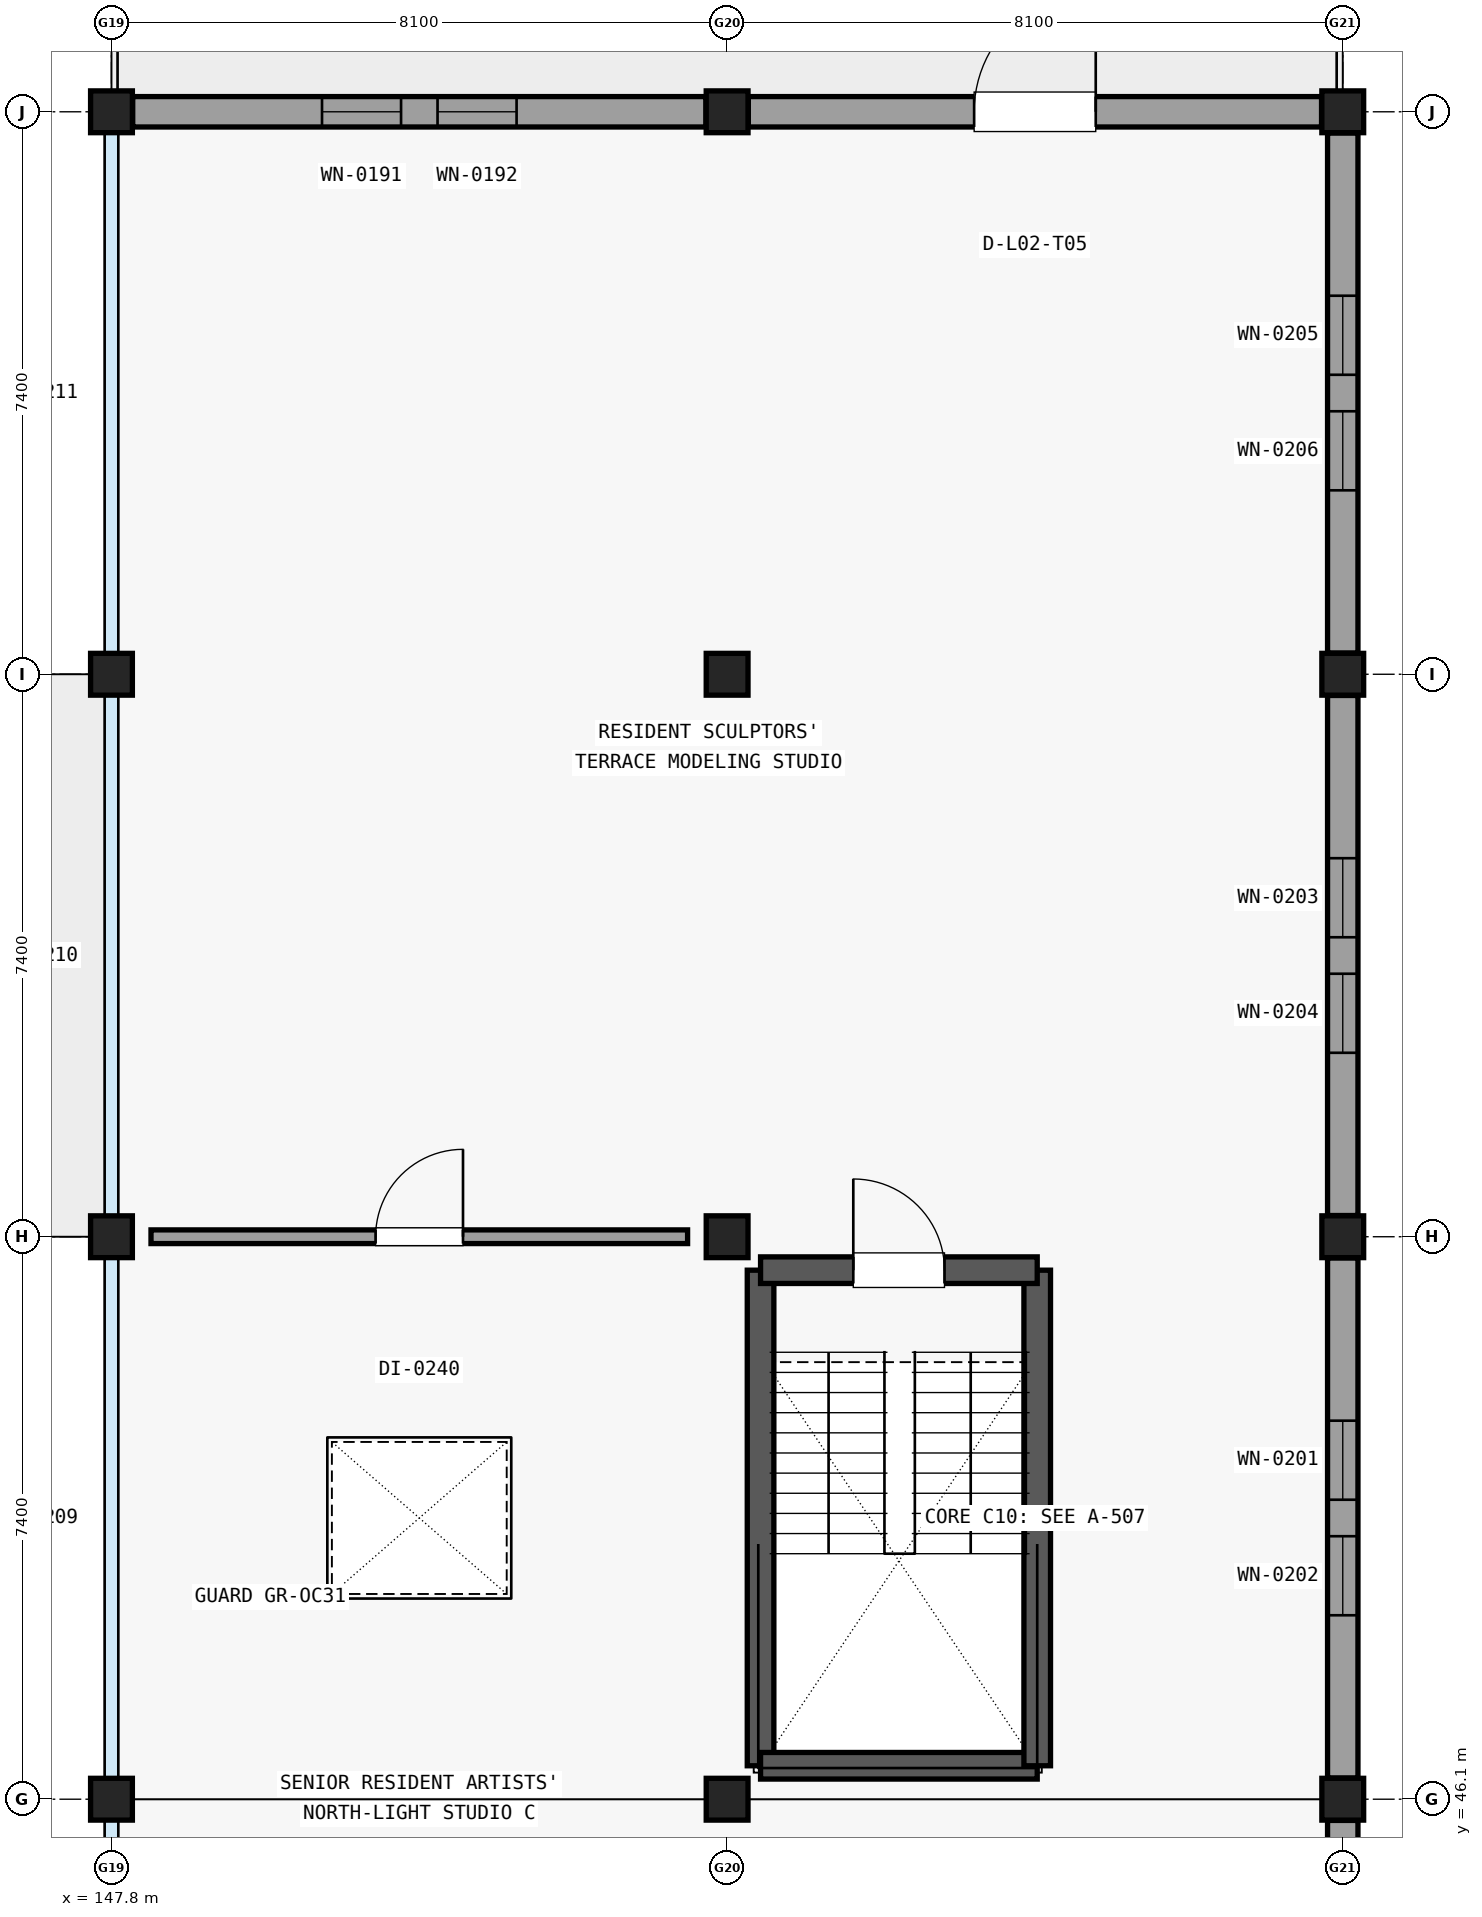
"""IFC4 building model, lengths in metres.
Left out: names, types, materials, properties, quantities, classifications, styles, units other than length and angle.
Written with IfcOpenShell. Run it as: python <this file> out.ifc"""

import sys

from ifc_helpers import new_model, si_unit, direction, frame, frame_2d, origin, origin_2d, place, context, subcontext, project, spatial, rectangle, extrude, element, fill, save


model = new_model("IFC4")
c1 = context("Model", 3, precision=1e-05, world=origin(), true_north=direction((0.0, 1.0)))
c2 = subcontext(c1, "Body", "Model", "MODEL_VIEW")
j1 = project(units=[si_unit("LENGTHUNIT", "METRE"), si_unit("PLANEANGLEUNIT", "RADIAN")], contexts=[c1])
p1 = place(None, origin())
s1 = spatial("IfcSite", under=j1, at=p1, CompositionType="ELEMENT")
p2 = place(p1, origin())
s2 = spatial("IfcBuilding", under=s1, at=p2, CompositionType="ELEMENT")
p3 = place(p2, frame((0.0, 0.0, 10.2)))
s3 = spatial("IfcBuildingStorey", under=s2, at=p3, CompositionType="ELEMENT", Elevation=10.2)
for number, where, z_axis, x_axis in (
    (1, (147.8, 46.1, 0.0), (0.0, 0.0, 1.0), (1.0, 0.0, 0.0)),
    (2, (147.8, 53.5, 0.0), (0.0, 0.0, 1.0), (1.0, 0.0, 0.0)),
    (3, (147.8, 60.9, 0.0), (0.0, 0.0, 1.0), (1.0, 0.0, 0.0)),
    (4, (147.8, 68.3, 0.0), (0.0, 0.0, 1.0), (1.0, 0.0, 0.0)),
    (5, (155.9, 46.1, 0.0), (0.0, 0.0, 1.0), (1.0, 0.0, 0.0)),
    (6, (155.9, 53.5, 0.0), (0.0, 0.0, 1.0), (1.0, 0.0, 0.0)),
    (7, (155.9, 60.9, 0.0), (0.0, 0.0, 1.0), (1.0, 0.0, 0.0)),
    (8, (155.9, 68.3, 0.0), (0.0, 0.0, 1.0), (1.0, 0.0, 0.0)),
    (9, (164.0, 46.1, 0.0), (0.0, 0.0, 1.0), (1.0, 0.0, 0.0)),
    (10, (164.0, 53.5, 0.0), (0.0, 0.0, 1.0), (1.0, 0.0, 0.0)),
    (11, (164.0, 60.9, 0.0), (0.0, 0.0, 1.0), (1.0, 0.0, 0.0)),
    (12, (164.0, 68.3, 0.0), (0.0, 0.0, 1.0), (1.0, 0.0, 0.0)),
):
    element("IfcColumn", number, at=place(p3, frame(where, z_axis=z_axis, x_axis=x_axis)), inside=s3, PredefinedType="COLUMN", context=c2, shape_type="SweptSolid", body=[
        extrude(rectangle(XDim=0.55, YDim=0.55, at=origin_2d()), origin(), (0.0, 0.0, 1.0), 3.37),
    ])
p4 = place(p3, frame((148.079, 68.3, 0.0), z_axis=(0.0, 0.0, 1.0), x_axis=(1.0, 0.0, 0.0)))
e13 = element("IfcWall", 13, at=p4, inside=s3, PredefinedType="SOLIDWALL", context=c2, shape_type="SweptSolid", body=[
    extrude(rectangle(XDim=7.542, YDim=0.4, at=frame_2d((3.771, 0.0))), origin(), (0.0, 0.0, 1.0), 2.898),
])
p5 = place(p4, frame((2.491, 0.0, 0.6)))
e14 = element("IfcOpeningElement", 14, at=p5, cuts=e13, PredefinedType="OPENING", context=c2, shape_type="SweptSolid", body=[
    extrude(rectangle(XDim=1.04, YDim=2.06, at=frame_2d((0.52, 1.03))), frame((0.0, 0.21, 0.0), z_axis=(0.0, -1.0, 0.0), x_axis=(1.0, 0.0, 0.0)), (0.0, 0.0, 1.0), 0.42),
])
p6 = place(p4, frame((4.011, 0.0, 0.6)))
e15 = element("IfcOpeningElement", 15, at=p6, cuts=e13, PredefinedType="OPENING", context=c2, shape_type="SweptSolid", body=[
    extrude(rectangle(XDim=1.04, YDim=2.06, at=frame_2d((0.52, 1.03))), frame((0.0, 0.21, 0.0), z_axis=(0.0, -1.0, 0.0), x_axis=(1.0, 0.0, 0.0)), (0.0, 0.0, 1.0), 0.42),
])
p7 = place(p3, frame((164.0, 45.821, 0.0), z_axis=(0.0, 0.0, 1.0), x_axis=(0.0, -1.0, 0.0)))
e16 = element("IfcWall", 16, at=p7, inside=s3, PredefinedType="SOLIDWALL", context=c2, shape_type="SweptSolid", body=[
    extrude(rectangle(XDim=6.842, YDim=0.4, at=frame_2d((3.421, 0.0))), origin(), (0.0, 0.0, 1.0), 2.898),
])
p8 = place(p7, frame((2.141, 0.0, 0.6)))
e17 = element("IfcOpeningElement", 17, at=p8, cuts=e16, PredefinedType="OPENING", context=c2, shape_type="SweptSolid", body=[
    extrude(rectangle(XDim=1.04, YDim=2.06, at=frame_2d((0.52, 1.03))), frame((0.0, 0.21, 0.0), z_axis=(0.0, -1.0, 0.0), x_axis=(1.0, 0.0, 0.0)), (0.0, 0.0, 1.0), 0.42),
])
p9 = place(p7, frame((3.661, 0.0, 0.6)))
e18 = element("IfcOpeningElement", 18, at=p9, cuts=e16, PredefinedType="OPENING", context=c2, shape_type="SweptSolid", body=[
    extrude(rectangle(XDim=1.04, YDim=2.06, at=frame_2d((0.52, 1.03))), frame((0.0, 0.21, 0.0), z_axis=(0.0, -1.0, 0.0), x_axis=(1.0, 0.0, 0.0)), (0.0, 0.0, 1.0), 0.42),
])
p10 = place(p3, frame((164.0, 53.221, 0.0), z_axis=(0.0, 0.0, 1.0), x_axis=(0.0, -1.0, 0.0)))
e19 = element("IfcWall", 19, at=p10, inside=s3, PredefinedType="SOLIDWALL", context=c2, shape_type="SweptSolid", body=[
    extrude(rectangle(XDim=6.842, YDim=0.4, at=frame_2d((3.421, 0.0))), origin(), (0.0, 0.0, 1.0), 2.898),
])
p11 = place(p10, frame((2.141, 0.0, 0.6)))
e20 = element("IfcOpeningElement", 20, at=p11, cuts=e19, PredefinedType="OPENING", context=c2, shape_type="SweptSolid", body=[
    extrude(rectangle(XDim=1.04, YDim=2.06, at=frame_2d((0.52, 1.03))), frame((0.0, 0.21, 0.0), z_axis=(0.0, -1.0, 0.0), x_axis=(1.0, 0.0, 0.0)), (0.0, 0.0, 1.0), 0.42),
])
p12 = place(p10, frame((3.661, 0.0, 0.6)))
e21 = element("IfcOpeningElement", 21, at=p12, cuts=e19, PredefinedType="OPENING", context=c2, shape_type="SweptSolid", body=[
    extrude(rectangle(XDim=1.04, YDim=2.06, at=frame_2d((0.52, 1.03))), frame((0.0, 0.21, 0.0), z_axis=(0.0, -1.0, 0.0), x_axis=(1.0, 0.0, 0.0)), (0.0, 0.0, 1.0), 0.42),
])
p13 = place(p3, frame((164.0, 60.621, 0.0), z_axis=(0.0, 0.0, 1.0), x_axis=(0.0, -1.0, 0.0)))
e22 = element("IfcWall", 22, at=p13, inside=s3, PredefinedType="SOLIDWALL", context=c2, shape_type="SweptSolid", body=[
    extrude(rectangle(XDim=6.842, YDim=0.4, at=frame_2d((3.421, 0.0))), origin(), (0.0, 0.0, 1.0), 2.898),
])
p14 = place(p13, frame((2.141, 0.0, 0.6)))
e23 = element("IfcOpeningElement", 23, at=p14, cuts=e22, PredefinedType="OPENING", context=c2, shape_type="SweptSolid", body=[
    extrude(rectangle(XDim=1.04, YDim=2.06, at=frame_2d((0.52, 1.03))), frame((0.0, 0.21, 0.0), z_axis=(0.0, -1.0, 0.0), x_axis=(1.0, 0.0, 0.0)), (0.0, 0.0, 1.0), 0.42),
])
p15 = place(p13, frame((3.661, 0.0, 0.6)))
e24 = element("IfcOpeningElement", 24, at=p15, cuts=e22, PredefinedType="OPENING", context=c2, shape_type="SweptSolid", body=[
    extrude(rectangle(XDim=1.04, YDim=2.06, at=frame_2d((0.52, 1.03))), frame((0.0, 0.21, 0.0), z_axis=(0.0, -1.0, 0.0), x_axis=(1.0, 0.0, 0.0)), (0.0, 0.0, 1.0), 0.42),
])
p16 = place(p3, frame((156.179, 68.3, 0.0), z_axis=(0.0, 0.0, 1.0), x_axis=(1.0, 0.0, 0.0)))
e25 = element("IfcWall", 25, at=p16, inside=s3, PredefinedType="SOLIDWALL", context=c2, shape_type="SweptSolid", body=[
    extrude(rectangle(XDim=7.542, YDim=0.4, at=frame_2d((3.771, 0.0))), origin(), (0.0, 0.0, 1.0), 2.898),
])
p17 = place(p16, frame((2.971, 0.0, 0.0)))
e26 = element("IfcOpeningElement", 26, at=p17, cuts=e25, PredefinedType="OPENING", context=c2, shape_type="SweptSolid", body=[
    extrude(rectangle(XDim=1.6, YDim=2.15, at=frame_2d((0.8, 1.075))), frame((0.0, 0.21, 0.0), z_axis=(0.0, -1.0, 0.0), x_axis=(1.0, 0.0, 0.0)), (0.0, 0.0, 1.0), 0.42),
])
p18 = place(p3, frame((164.0, 68.021, 0.0), z_axis=(0.0, 0.0, 1.0), x_axis=(0.0, -1.0, 0.0)))
e27 = element("IfcWall", 27, at=p18, inside=s3, PredefinedType="SOLIDWALL", context=c2, shape_type="SweptSolid", body=[
    extrude(rectangle(XDim=6.842, YDim=0.4, at=frame_2d((3.421, 0.0))), origin(), (0.0, 0.0, 1.0), 2.898),
])
p19 = place(p18, frame((2.141, 0.0, 0.6)))
e28 = element("IfcOpeningElement", 28, at=p19, cuts=e27, PredefinedType="OPENING", context=c2, shape_type="SweptSolid", body=[
    extrude(rectangle(XDim=1.04, YDim=2.06, at=frame_2d((0.52, 1.03))), frame((0.0, 0.21, 0.0), z_axis=(0.0, -1.0, 0.0), x_axis=(1.0, 0.0, 0.0)), (0.0, 0.0, 1.0), 0.42),
])
p20 = place(p18, frame((3.661, 0.0, 0.6)))
e29 = element("IfcOpeningElement", 29, at=p20, cuts=e27, PredefinedType="OPENING", context=c2, shape_type="SweptSolid", body=[
    extrude(rectangle(XDim=1.04, YDim=2.06, at=frame_2d((0.52, 1.03))), frame((0.0, 0.21, 0.0), z_axis=(0.0, -1.0, 0.0), x_axis=(1.0, 0.0, 0.0)), (0.0, 0.0, 1.0), 0.42),
])
p21 = place(p3, frame((156.34, 46.54, 0.0), z_axis=(0.0, 0.0, 1.0), x_axis=(0.0, 1.0, 0.0)))
e30 = element("IfcWall", 30, at=p21, inside=s3, PredefinedType="SHEAR", context=c2, shape_type="SweptSolid", body=[
    extrude(rectangle(XDim=6.52, YDim=0.35, at=frame_2d((3.26, 0.0))), origin(), (0.0, 0.0, 1.0), 3.365),
])
p22 = place(p3, frame((156.34, 46.54, 0.0), z_axis=(0.0, 0.0, 1.0), x_axis=(1.0, 0.0, 0.0)))
e31 = element("IfcWall", 31, at=p22, inside=s3, PredefinedType="SHEAR", context=c2, shape_type="SweptSolid", body=[
    extrude(rectangle(XDim=3.64, YDim=0.35, at=frame_2d((1.82, 0.0))), origin(), (0.0, 0.0, 1.0), 3.365),
])
p23 = place(p3, frame((159.98, 46.54, 0.0), z_axis=(0.0, 0.0, 1.0), x_axis=(0.0, 1.0, 0.0)))
e32 = element("IfcWall", 32, at=p23, inside=s3, PredefinedType="SHEAR", context=c2, shape_type="SweptSolid", body=[
    extrude(rectangle(XDim=6.52, YDim=0.35, at=frame_2d((3.26, 0.0))), origin(), (0.0, 0.0, 1.0), 3.365),
])
p24 = place(p3, frame((156.34, 53.06, 0.0), z_axis=(0.0, 0.0, 1.0), x_axis=(1.0, 0.0, 0.0)))
e33 = element("IfcWall", 33, at=p24, inside=s3, PredefinedType="SHEAR", context=c2, shape_type="SweptSolid", body=[
    extrude(rectangle(XDim=3.64, YDim=0.35, at=frame_2d((1.82, 0.0))), origin(), (0.0, 0.0, 1.0), 3.365),
])
p25 = place(p24, frame((1.22, 0.0, 0.0)))
e34 = element("IfcOpeningElement", 34, at=p25, cuts=e33, PredefinedType="OPENING", context=c2, shape_type="SweptSolid", body=[
    extrude(rectangle(XDim=1.2, YDim=2.15, at=frame_2d((0.6, 1.075))), frame((0.0, 0.185, 0.0), z_axis=(0.0, -1.0, 0.0), x_axis=(1.0, 0.0, 0.0)), (0.0, 0.0, 1.0), 0.37),
])
p26 = place(p3, frame((148.32, 53.5, 0.0), z_axis=(0.0, 0.0, 1.0), x_axis=(1.0, 0.0, 0.0)))
e35 = element("IfcWall", 35, at=p26, inside=s3, PredefinedType="PARTITIONING", context=c2, shape_type="SweptSolid", body=[
    extrude(rectangle(XDim=7.06, YDim=0.18, at=frame_2d((3.53, 0.0))), origin(), (0.0, 0.0, 1.0), 2.903),
])
p27 = place(p26, frame((2.955, 0.0, 0.0)))
e36 = element("IfcOpeningElement", 36, at=p27, cuts=e35, PredefinedType="OPENING", context=c2, shape_type="SweptSolid", body=[
    extrude(rectangle(XDim=1.15, YDim=2.15, at=frame_2d((0.575, 1.075))), frame((0.0, 0.1, 0.0), z_axis=(0.0, -1.0, 0.0), x_axis=(1.0, 0.0, 0.0)), (0.0, 0.0, 1.0), 0.2),
])
p28 = place(p5, origin())
e37 = element("IfcWindow", 37, at=p28, inside=s3, PartitioningType="SINGLE_PANEL", PredefinedType="WINDOW", context=c2, shape_type="SweptSolid", body=[
    extrude(rectangle(XDim=1.04, YDim=2.06, at=frame_2d((0.52, 1.03))), frame((0.0, 0.03, 0.0), z_axis=(0.0, -1.0, 0.0), x_axis=(1.0, 0.0, 0.0)), (0.0, 0.0, 1.0), 0.06),
])
fill(e14, e37)
p29 = place(p6, origin())
e38 = element("IfcWindow", 38, at=p29, inside=s3, PartitioningType="SINGLE_PANEL", PredefinedType="WINDOW", context=c2, shape_type="SweptSolid", body=[
    extrude(rectangle(XDim=1.04, YDim=2.06, at=frame_2d((0.52, 1.03))), frame((0.0, 0.03, 0.0), z_axis=(0.0, -1.0, 0.0), x_axis=(1.0, 0.0, 0.0)), (0.0, 0.0, 1.0), 0.06),
])
fill(e15, e38)
p30 = place(p11, origin())
e39 = element("IfcWindow", 39, at=p30, inside=s3, PartitioningType="SINGLE_PANEL", PredefinedType="WINDOW", context=c2, shape_type="SweptSolid", body=[
    extrude(rectangle(XDim=1.04, YDim=2.06, at=frame_2d((0.52, 1.03))), frame((0.0, 0.03, 0.0), z_axis=(0.0, -1.0, 0.0), x_axis=(1.0, 0.0, 0.0)), (0.0, 0.0, 1.0), 0.06),
])
fill(e20, e39)
p31 = place(p12, origin())
e40 = element("IfcWindow", 40, at=p31, inside=s3, PartitioningType="SINGLE_PANEL", PredefinedType="WINDOW", context=c2, shape_type="SweptSolid", body=[
    extrude(rectangle(XDim=1.04, YDim=2.06, at=frame_2d((0.52, 1.03))), frame((0.0, 0.03, 0.0), z_axis=(0.0, -1.0, 0.0), x_axis=(1.0, 0.0, 0.0)), (0.0, 0.0, 1.0), 0.06),
])
fill(e21, e40)
p32 = place(p14, origin())
e41 = element("IfcWindow", 41, at=p32, inside=s3, PartitioningType="SINGLE_PANEL", PredefinedType="WINDOW", context=c2, shape_type="SweptSolid", body=[
    extrude(rectangle(XDim=1.04, YDim=2.06, at=frame_2d((0.52, 1.03))), frame((0.0, 0.03, 0.0), z_axis=(0.0, -1.0, 0.0), x_axis=(1.0, 0.0, 0.0)), (0.0, 0.0, 1.0), 0.06),
])
fill(e23, e41)
p33 = place(p15, origin())
e42 = element("IfcWindow", 42, at=p33, inside=s3, PartitioningType="SINGLE_PANEL", PredefinedType="WINDOW", context=c2, shape_type="SweptSolid", body=[
    extrude(rectangle(XDim=1.04, YDim=2.06, at=frame_2d((0.52, 1.03))), frame((0.0, 0.03, 0.0), z_axis=(0.0, -1.0, 0.0), x_axis=(1.0, 0.0, 0.0)), (0.0, 0.0, 1.0), 0.06),
])
fill(e24, e42)
p34 = place(p17, origin())
e43 = element("IfcDoor", 43, at=p34, inside=s3, OperationType="SINGLE_SWING_RIGHT", PredefinedType="DOOR", context=c2, shape_type="SweptSolid", body=[
    extrude(rectangle(XDim=1.6, YDim=2.15, at=frame_2d((0.8, 1.075))), frame((0.0, 0.025, 0.0), z_axis=(0.0, -1.0, 0.0), x_axis=(1.0, 0.0, 0.0)), (0.0, 0.0, 1.0), 0.05),
])
fill(e26, e43)
p35 = place(p19, origin())
e44 = element("IfcWindow", 44, at=p35, inside=s3, PartitioningType="SINGLE_PANEL", PredefinedType="WINDOW", context=c2, shape_type="SweptSolid", body=[
    extrude(rectangle(XDim=1.04, YDim=2.06, at=frame_2d((0.52, 1.03))), frame((0.0, 0.03, 0.0), z_axis=(0.0, -1.0, 0.0), x_axis=(1.0, 0.0, 0.0)), (0.0, 0.0, 1.0), 0.06),
])
fill(e28, e44)
p36 = place(p20, origin())
e45 = element("IfcWindow", 45, at=p36, inside=s3, PartitioningType="SINGLE_PANEL", PredefinedType="WINDOW", context=c2, shape_type="SweptSolid", body=[
    extrude(rectangle(XDim=1.04, YDim=2.06, at=frame_2d((0.52, 1.03))), frame((0.0, 0.03, 0.0), z_axis=(0.0, -1.0, 0.0), x_axis=(1.0, 0.0, 0.0)), (0.0, 0.0, 1.0), 0.06),
])
fill(e29, e45)
p37 = place(p25, origin())
e46 = element("IfcDoor", 46, at=p37, inside=s3, OperationType="SINGLE_SWING_LEFT", PredefinedType="DOOR", context=c2, shape_type="SweptSolid", body=[
    extrude(rectangle(XDim=1.2, YDim=2.15, at=frame_2d((0.6, 1.075))), frame((0.0, 0.025, 0.0), z_axis=(0.0, -1.0, 0.0), x_axis=(1.0, 0.0, 0.0)), (0.0, 0.0, 1.0), 0.05),
])
fill(e34, e46)
p38 = place(p27, origin())
e47 = element("IfcDoor", 47, at=p38, inside=s3, OperationType="SINGLE_SWING_RIGHT", PredefinedType="DOOR", context=c2, shape_type="SweptSolid", body=[
    extrude(rectangle(XDim=1.15, YDim=2.15, at=frame_2d((0.575, 1.075))), frame((0.0, 0.025, 0.0), z_axis=(0.0, -1.0, 0.0), x_axis=(1.0, 0.0, 0.0)), (0.0, 0.0, 1.0), 0.05),
])
fill(e36, e47)
save(model, sys.argv[1])
